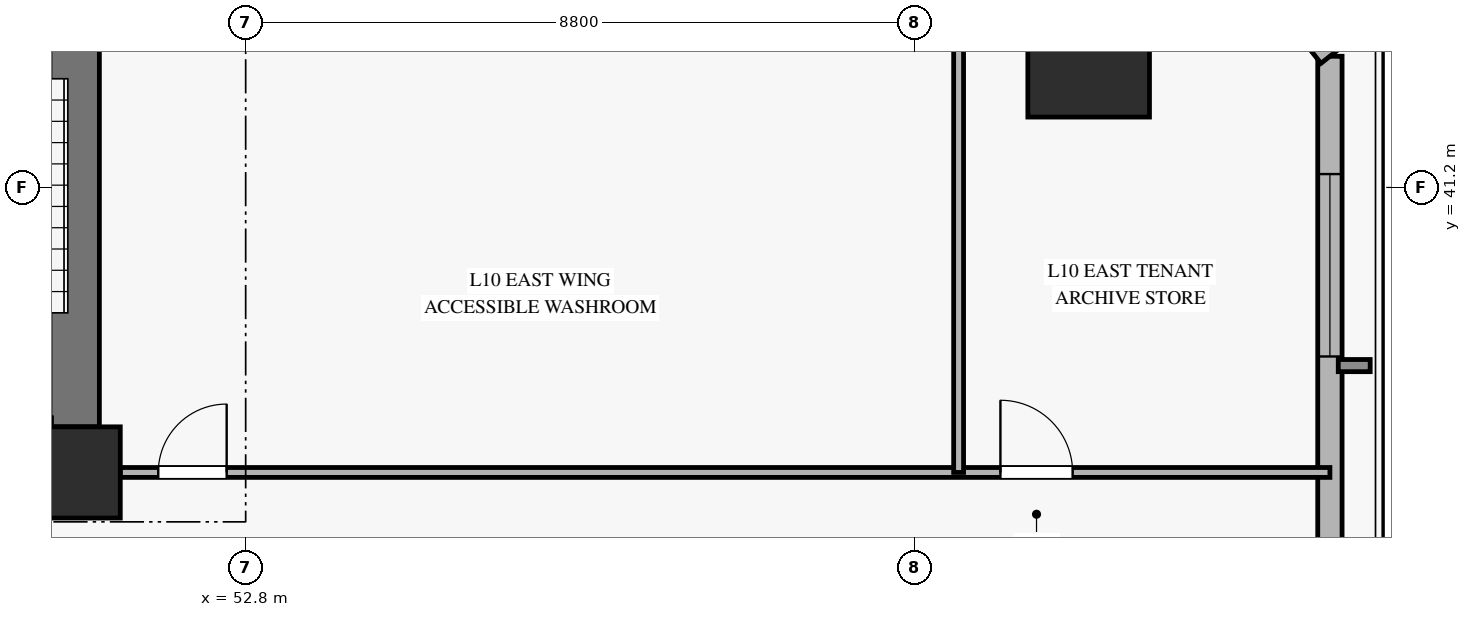
"""IFC4 building model, lengths in metres.
Left out: names, types, materials, properties, quantities, classifications, styles, units other than length and angle.
Written with IfcOpenShell. Run it as: python <this file> out.ifc"""

import sys

from ifc_helpers import new_model, si_unit, direction, frame, frame_2d, origin, origin_2d, place, context, subcontext, project, spatial, rectangle, hollow_rectangle, extrude, source, transform, mapped, element, fill, save


model = new_model("IFC4")
c1 = context("Model", 3, precision=1e-05, world=origin(), true_north=direction((0.0, 1.0)))
c2 = subcontext(c1, "Body", "Model", "MODEL_VIEW")
j1 = project(units=[si_unit("LENGTHUNIT", "METRE"), si_unit("PLANEANGLEUNIT", "RADIAN")], contexts=[c1])
p1 = place(None, origin())
s1 = spatial("IfcSite", under=j1, at=p1, CompositionType="ELEMENT")
p2 = place(p1, origin())
s2 = spatial("IfcBuilding", under=s1, at=p2, CompositionType="ELEMENT")
p3 = place(p2, frame((0.0, 0.0, 41.0)))
s3 = spatial("IfcBuildingStorey", under=s2, at=p3, CompositionType="ELEMENT", Elevation=41.0)
m1 = source(origin(), c2, "Body", "SweptSolid", [
    extrude(rectangle(XDim=1.2, YDim=1.2, at=origin_2d()), origin(), (0.0, 0.0, 1.0), 3.68),
])
p4 = place(p3, frame((50.55, 37.45, 0.0), z_axis=(0.0, 0.0, 1.0), x_axis=(1.0, 0.0, 0.0)))
e1 = element("IfcColumn", 1, at=p4, inside=s3, PredefinedType="PILASTER", context=c2, shape_type="MappedRepresentation", body=[
    mapped(m1, transform((0.0, 0.0, 0.0), x_axis=(1.0, 0.0, 0.0), y_axis=(0.0, 1.0, 0.0), z_axis=(0.0, 0.0, 1.0), scale=1.0)),
])
p5 = place(p3, frame((50.55, 38.05, 0.0), z_axis=(0.0, 0.0, 1.0), x_axis=(0.0, 1.0, 0.0)))
e2 = element("IfcWall", 2, at=p5, inside=s3, PredefinedType="SHEAR", context=c2, shape_type="SweptSolid", body=[
    extrude(rectangle(XDim=7.9, YDim=0.65, at=frame_2d((3.95, 0.0))), origin(), (0.0, 0.0, 1.0), 3.68),
])
m2 = source(origin(), c2, "Body", "SweptSolid", [
    extrude(hollow_rectangle(XDim=1.6, YDim=1.6, WallThickness=0.075, at=origin_2d()), origin(), (0.0, 0.0, 1.0), 3.68),
])
p6 = place(p3, frame((63.891, 42.926, 0.0), z_axis=(0.0, 0.0, 1.0), x_axis=(1.0, 0.0, 0.0)))
e3 = element("IfcColumn", 3, at=p6, inside=s3, PredefinedType="COLUMN", context=c2, shape_type="MappedRepresentation", body=[
    mapped(m2, transform((0.0, 0.0, 0.0), x_axis=(1.0, 0.0, 0.0), y_axis=(0.0, 1.0, 0.0), z_axis=(0.0, 0.0, 1.0), scale=1.0)),
])
p7 = place(p3, frame((67.065, 25.513, 0.0), z_axis=(0.0, 0.0, 1.0), x_axis=(0.0, 1.0, 0.0)))
e4 = element("IfcWall", 4, at=p7, inside=s3, PredefinedType="SOLIDWALL", context=c2, shape_type="SweptSolid", body=[
    extrude(rectangle(XDim=17.413, YDim=0.32, at=frame_2d((8.707, 0.0))), origin(), (0.0, 0.0, 1.0), 3.16),
])
p8 = place(p7, frame((1.407, 0.0, 0.45)))
e5 = element("IfcOpeningElement", 5, at=p8, cuts=e4, PredefinedType="OPENING", context=c2, shape_type="SweptSolid", body=[
    extrude(rectangle(XDim=2.4, YDim=2.1, at=frame_2d((1.2, 1.05))), frame((0.0, 0.17, 0.0), z_axis=(0.0, -1.0, 0.0), x_axis=(1.0, 0.0, 0.0)), (0.0, 0.0, 1.0), 0.34),
])
p9 = place(p7, frame((13.463, 0.0, 0.45)))
e6 = element("IfcOpeningElement", 6, at=p9, cuts=e4, PredefinedType="OPENING", context=c2, shape_type="SweptSolid", body=[
    extrude(rectangle(XDim=2.4, YDim=2.1, at=frame_2d((1.2, 1.05))), frame((0.0, 0.17, 0.0), z_axis=(0.0, -1.0, 0.0), x_axis=(1.0, 0.0, 0.0)), (0.0, 0.0, 1.0), 0.34),
])
p10 = place(p3, frame((67.065, 42.926, 0.0), z_axis=(0.0, 0.0, 1.0), x_axis=(-0.619619988795, 0.784901948963, 0.0)))
e7 = element("IfcWall", 7, at=p10, inside=s3, PredefinedType="SOLIDWALL", context=c2, shape_type="SweptSolid", body=[
    extrude(rectangle(XDim=4.235, YDim=0.3, at=frame_2d((2.117, 0.0))), origin(), (0.0, 0.0, 1.0), 3.16),
])
p11 = place(p10, frame((1.317, 0.0, 0.45)))
e8 = element("IfcOpeningElement", 8, at=p11, cuts=e7, PredefinedType="OPENING", context=c2, shape_type="SweptSolid", body=[
    extrude(rectangle(XDim=1.6, YDim=2.0, at=frame_2d((0.8, 1.0))), frame((0.0, 0.16, 0.0), z_axis=(0.0, -1.0, 0.0), x_axis=(1.0, 0.0, 0.0)), (0.0, 0.0, 1.0), 0.32),
])
p12 = place(p3, frame((51.15, 37.45, 0.0), z_axis=(0.0, 0.0, 1.0), x_axis=(1.0, 0.0, 0.0)))
e9 = element("IfcWall", 9, at=p12, inside=s3, PredefinedType="PARTITIONING", context=c2, shape_type="SweptSolid", body=[
    extrude(rectangle(XDim=15.915, YDim=0.13, at=frame_2d((7.958, 0.0))), origin(), (0.0, 0.0, 1.0), 3.165),
])
p13 = place(p12, frame((0.5, 0.0, 0.0)))
e10 = element("IfcOpeningElement", 10, at=p13, cuts=e9, PredefinedType="OPENING", context=c2, shape_type="SweptSolid", body=[
    extrude(rectangle(XDim=0.9, YDim=2.1, at=frame_2d((0.45, 1.05))), frame((0.0, 0.075, 0.0), z_axis=(0.0, -1.0, 0.0), x_axis=(1.0, 0.0, 0.0)), (0.0, 0.0, 1.0), 0.15),
])
p14 = place(p12, frame((11.58, 0.0, 0.0)))
e11 = element("IfcOpeningElement", 11, at=p14, cuts=e9, PredefinedType="OPENING", context=c2, shape_type="SweptSolid", body=[
    extrude(rectangle(XDim=0.95, YDim=2.1, at=frame_2d((0.475, 1.05))), frame((0.0, 0.075, 0.0), z_axis=(0.0, -1.0, 0.0), x_axis=(1.0, 0.0, 0.0)), (0.0, 0.0, 1.0), 0.15),
])
p15 = place(p3, frame((62.18, 37.45, 0.0), z_axis=(0.0, 0.0, 1.0), x_axis=(0.0, 1.0, 0.0)))
e12 = element("IfcWall", 12, at=p15, inside=s3, PredefinedType="PARTITIONING", context=c2, shape_type="SweptSolid", body=[
    extrude(rectangle(XDim=8.8, YDim=0.13, at=frame_2d((4.4, 0.0))), origin(), (0.0, 0.0, 1.0), 3.68),
])
m3 = source(origin(), c2, "Body", "SweptSolid", [
    extrude(rectangle(XDim=2.4, YDim=2.1, at=frame_2d((1.2, 1.05))), frame((0.0, 0.03, 0.0), z_axis=(0.0, -1.0, 0.0), x_axis=(1.0, 0.0, 0.0)), (0.0, 0.0, 1.0), 0.06),
])
p16 = place(p9, origin())
e13 = element("IfcWindow", 13, at=p16, inside=s3, PartitioningType="SINGLE_PANEL", PredefinedType="WINDOW", context=c2, shape_type="MappedRepresentation", body=[
    mapped(m3, transform((0.0, 0.0, 0.0), x_axis=(1.0, 0.0, 0.0), y_axis=(0.0, 1.0, 0.0), z_axis=(0.0, 0.0, 1.0), scale=1.0)),
])
fill(e6, e13)
m4 = source(origin(), c2, "Body", "SweptSolid", [
    extrude(rectangle(XDim=0.9, YDim=2.1, at=frame_2d((0.45, 1.05))), frame((0.0, 0.025, 0.0), z_axis=(0.0, -1.0, 0.0), x_axis=(1.0, 0.0, 0.0)), (0.0, 0.0, 1.0), 0.05),
])
p17 = place(p13, origin())
e14 = element("IfcDoor", 14, at=p17, inside=s3, OperationType="SINGLE_SWING_RIGHT", PredefinedType="DOOR", context=c2, shape_type="MappedRepresentation", body=[
    mapped(m4, transform((0.0, 0.0, 0.0), x_axis=(1.0, 0.0, 0.0), y_axis=(0.0, 1.0, 0.0), z_axis=(0.0, 0.0, 1.0), scale=1.0)),
])
fill(e10, e14)
m5 = source(origin(), c2, "Body", "SweptSolid", [
    extrude(rectangle(XDim=0.95, YDim=2.1, at=frame_2d((0.475, 1.05))), frame((0.0, 0.025, 0.0), z_axis=(0.0, -1.0, 0.0), x_axis=(1.0, 0.0, 0.0)), (0.0, 0.0, 1.0), 0.05),
])
p18 = place(p14, origin())
e15 = element("IfcDoor", 15, at=p18, inside=s3, OperationType="SINGLE_SWING_LEFT", PredefinedType="DOOR", context=c2, shape_type="MappedRepresentation", body=[
    mapped(m5, transform((0.0, 0.0, 0.0), x_axis=(1.0, 0.0, 0.0), y_axis=(0.0, 1.0, 0.0), z_axis=(0.0, 0.0, 1.0), scale=1.0)),
])
fill(e11, e15)
save(model, sys.argv[1])
